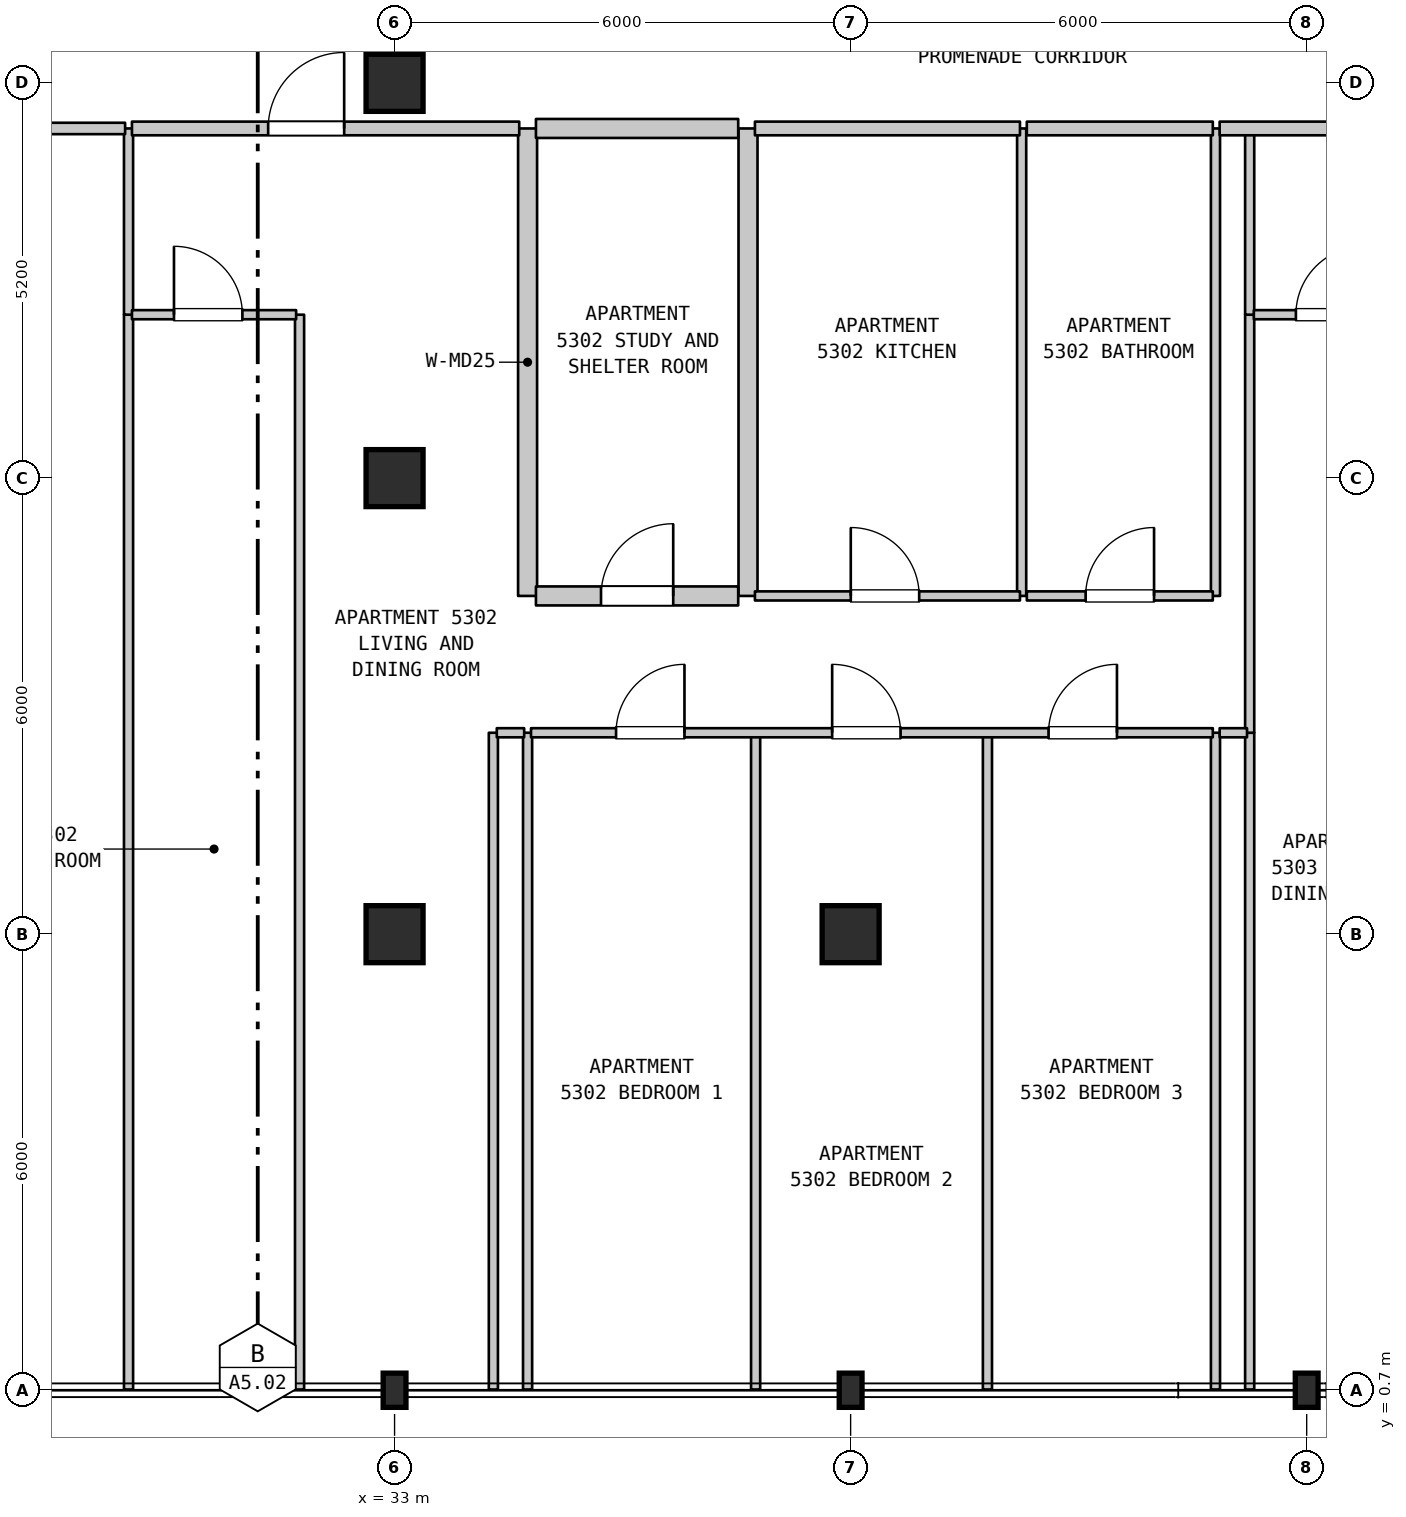
"""IFC4 building model, lengths in metres.
Left out: names, types, materials, properties, quantities, classifications, styles, units other than length and angle.
Written with IfcOpenShell. Run it as: python <this file> out.ifc"""

import sys

from ifc_helpers import new_model, si_unit, direction, frame, frame_2d, origin, origin_2d, place, context, subcontext, project, spatial, rectangle, i_section, extrude, element, fill, save


model = new_model("IFC4")
c1 = context("Model", 3, precision=1e-05, world=origin(), true_north=direction((0.0, 1.0)))
c2 = subcontext(c1, "Body", "Model", "MODEL_VIEW")
j1 = project(units=[si_unit("LENGTHUNIT", "METRE"), si_unit("PLANEANGLEUNIT", "RADIAN")], contexts=[c1])
p1 = place(None, origin())
s1 = spatial("IfcSite", under=j1, at=p1, CompositionType="ELEMENT")
p2 = place(p1, origin())
s2 = spatial("IfcBuilding", under=s1, at=p2, CompositionType="ELEMENT")
p3 = place(p2, frame((0.0, 0.0, 214.3)))
s3 = spatial("IfcBuildingStorey", under=s2, at=p3, CompositionType="ELEMENT", Elevation=214.3)
p4 = place(p3, frame((33.0, 0.7, 0.0), z_axis=(0.0, 0.0, 1.0), x_axis=(1.0, 0.0, 0.0)))
e1 = element("IfcColumn", 1, at=p4, inside=s3, PredefinedType="COLUMN", context=c2, shape_type="SweptSolid", body=[
    extrude(i_section(OverallWidth=0.3, OverallDepth=0.45, WebThickness=0.014, FlangeThickness=0.026, FilletRadius=0.027, at=origin_2d()), origin(), (0.0, 0.0, 1.0), 3.7),
])
for number, where, z_axis, x_axis in (
    (2, (33.0, 6.7, 0.0), (0.0, 0.0, 1.0), (1.0, 0.0, 0.0)),
    (3, (33.0, 12.7, 0.0), (0.0, 0.0, 1.0), (1.0, 0.0, 0.0)),
    (4, (33.0, 17.9, 0.0), (0.0, 0.0, 1.0), (1.0, 0.0, 0.0)),
):
    element("IfcColumn", number, at=place(p3, frame(where, z_axis=z_axis, x_axis=x_axis)), inside=s3, PredefinedType="COLUMN", context=c2, shape_type="SweptSolid", body=[
        extrude(rectangle(XDim=0.75, YDim=0.75, at=origin_2d()), origin(), (0.0, 0.0, 1.0), 3.7),
    ])
p5 = place(p3, frame((39.0, 0.7, 0.0), z_axis=(0.0, 0.0, 1.0), x_axis=(1.0, 0.0, 0.0)))
e5 = element("IfcColumn", 5, at=p5, inside=s3, PredefinedType="COLUMN", context=c2, shape_type="SweptSolid", body=[
    extrude(i_section(OverallWidth=0.3, OverallDepth=0.45, WebThickness=0.014, FlangeThickness=0.026, FilletRadius=0.027, at=origin_2d()), origin(), (0.0, 0.0, 1.0), 3.7),
])
p6 = place(p3, frame((39.0, 6.7, 0.0), z_axis=(0.0, 0.0, 1.0), x_axis=(1.0, 0.0, 0.0)))
e6 = element("IfcColumn", 6, at=p6, inside=s3, PredefinedType="COLUMN", context=c2, shape_type="SweptSolid", body=[
    extrude(rectangle(XDim=0.75, YDim=0.75, at=origin_2d()), origin(), (0.0, 0.0, 1.0), 3.7),
])
p7 = place(p3, frame((45.0, 0.7, 0.0), z_axis=(0.0, 0.0, 1.0), x_axis=(1.0, 0.0, 0.0)))
e7 = element("IfcColumn", 7, at=p7, inside=s3, PredefinedType="COLUMN", context=c2, shape_type="SweptSolid", body=[
    extrude(i_section(OverallWidth=0.3, OverallDepth=0.45, WebThickness=0.014, FlangeThickness=0.026, FilletRadius=0.027, at=origin_2d()), origin(), (0.0, 0.0, 1.0), 3.7),
])
p8 = place(p3, frame((29.5, 0.71, 0.0), z_axis=(0.0, 0.0, 1.0), x_axis=(0.0, 1.0, 0.0)))
e8 = element("IfcWall", 8, at=p8, inside=s3, PredefinedType="PARTITIONING", context=c2, shape_type="SweptSolid", body=[
    extrude(rectangle(XDim=14.14, YDim=0.12, at=frame_2d((7.07, 0.0))), origin(), (0.0, 0.0, 1.0), 3.38),
])
p9 = place(p3, frame((29.5, 14.85, 0.0), z_axis=(0.0, 0.0, 1.0), x_axis=(0.0, 1.0, 0.0)))
e9 = element("IfcWall", 9, at=p9, inside=s3, PredefinedType="PARTITIONING", context=c2, shape_type="SweptSolid", body=[
    extrude(rectangle(XDim=2.45, YDim=0.12, at=frame_2d((1.225, 0.0))), origin(), (0.0, 0.0, 1.0), 3.38),
])
p10 = place(p3, frame((31.75, 0.71, 0.0), z_axis=(0.0, 0.0, 1.0), x_axis=(0.0, 1.0, 0.0)))
e10 = element("IfcWall", 10, at=p10, inside=s3, PredefinedType="PARTITIONING", context=c2, shape_type="SweptSolid", body=[
    extrude(rectangle(XDim=14.14, YDim=0.12, at=frame_2d((7.07, 0.0))), origin(), (0.0, 0.0, 1.0), 3.38),
])
for number, where, z_axis, x_axis in (
    (11, (34.3, 0.71, 0.0), (0.0, 0.0, 1.0), (0.0, 1.0, 0.0)),
    (12, (34.75, 0.71, 0.0), (0.0, 0.0, 1.0), (0.0, 1.0, 0.0)),
):
    element("IfcWall", number, at=place(p3, frame(where, z_axis=z_axis, x_axis=x_axis)), inside=s3, PredefinedType="PARTITIONING", context=c2, shape_type="SweptSolid", body=[
        extrude(rectangle(XDim=8.64, YDim=0.12, at=frame_2d((4.32, 0.0))), origin(), (0.0, 0.0, 1.0), 3.38),
    ])
for number, where, z_axis, x_axis in (
    (13, (34.75, 11.15, 0.0), (0.0, 0.0, 1.0), (0.0, 1.0, 0.0)),
    (14, (37.65, 11.15, 0.0), (0.0, 0.0, 1.0), (0.0, 1.0, 0.0)),
):
    element("IfcWall", number, at=place(p3, frame(where, z_axis=z_axis, x_axis=x_axis)), inside=s3, PredefinedType="STANDARD", context=c2, shape_type="SweptSolid", body=[
        extrude(rectangle(XDim=6.15, YDim=0.25, at=frame_2d((3.075, 0.0))), origin(), (0.0, 0.0, 1.0), 3.38),
    ])
for number, where, z_axis, x_axis in (
    (15, (37.75, 0.71, 0.0), (0.0, 0.0, 1.0), (0.0, 1.0, 0.0)),
    (16, (40.8, 0.71, 0.0), (0.0, 0.0, 1.0), (0.0, 1.0, 0.0)),
):
    element("IfcWall", number, at=place(p3, frame(where, z_axis=z_axis, x_axis=x_axis)), inside=s3, PredefinedType="PARTITIONING", context=c2, shape_type="SweptSolid", body=[
        extrude(rectangle(XDim=8.64, YDim=0.12, at=frame_2d((4.32, 0.0))), origin(), (0.0, 0.0, 1.0), 3.38),
    ])
p11 = place(p3, frame((41.25, 11.15, 0.0), z_axis=(0.0, 0.0, 1.0), x_axis=(0.0, 1.0, 0.0)))
e17 = element("IfcWall", 17, at=p11, inside=s3, PredefinedType="PARTITIONING", context=c2, shape_type="SweptSolid", body=[
    extrude(rectangle(XDim=6.15, YDim=0.12, at=frame_2d((3.075, 0.0))), origin(), (0.0, 0.0, 1.0), 3.38),
])
p12 = place(p3, frame((43.8, 0.71, 0.0), z_axis=(0.0, 0.0, 1.0), x_axis=(0.0, 1.0, 0.0)))
e18 = element("IfcWall", 18, at=p12, inside=s3, PredefinedType="PARTITIONING", context=c2, shape_type="SweptSolid", body=[
    extrude(rectangle(XDim=8.64, YDim=0.12, at=frame_2d((4.32, 0.0))), origin(), (0.0, 0.0, 1.0), 3.38),
])
p13 = place(p3, frame((43.8, 11.15, 0.0), z_axis=(0.0, 0.0, 1.0), x_axis=(0.0, 1.0, 0.0)))
e19 = element("IfcWall", 19, at=p13, inside=s3, PredefinedType="PARTITIONING", context=c2, shape_type="SweptSolid", body=[
    extrude(rectangle(XDim=6.15, YDim=0.12, at=frame_2d((3.075, 0.0))), origin(), (0.0, 0.0, 1.0), 3.38),
])
p14 = place(p3, frame((44.25, 0.71, 0.0), z_axis=(0.0, 0.0, 1.0), x_axis=(0.0, 1.0, 0.0)))
e20 = element("IfcWall", 20, at=p14, inside=s3, PredefinedType="PARTITIONING", context=c2, shape_type="SweptSolid", body=[
    extrude(rectangle(XDim=8.64, YDim=0.12, at=frame_2d((4.32, 0.0))), origin(), (0.0, 0.0, 1.0), 3.38),
])
p15 = place(p3, frame((44.25, 9.35, 0.0), z_axis=(0.0, 0.0, 1.0), x_axis=(0.0, 1.0, 0.0)))
e21 = element("IfcWall", 21, at=p15, inside=s3, PredefinedType="PARTITIONING", context=c2, shape_type="SweptSolid", body=[
    extrude(rectangle(XDim=5.5, YDim=0.12, at=frame_2d((2.75, 0.0))), origin(), (0.0, 0.0, 1.0), 3.38),
])
p16 = place(p3, frame((44.25, 14.85, 0.0), z_axis=(0.0, 0.0, 1.0), x_axis=(0.0, 1.0, 0.0)))
e22 = element("IfcWall", 22, at=p16, inside=s3, PredefinedType="PARTITIONING", context=c2, shape_type="SweptSolid", body=[
    extrude(rectangle(XDim=2.45, YDim=0.12, at=frame_2d((1.225, 0.0))), origin(), (0.0, 0.0, 1.0), 3.38),
])
p17 = place(p3, frame((34.345, 9.35, 0.0), z_axis=(0.0, 0.0, 1.0), x_axis=(1.0, 0.0, 0.0)))
e23 = element("IfcWall", 23, at=p17, inside=s3, PredefinedType="PARTITIONING", context=c2, shape_type="SweptSolid", body=[
    extrude(rectangle(XDim=0.36, YDim=0.12, at=frame_2d((0.18, 0.0))), origin(), (0.0, 0.0, 1.0), 3.38),
])
p18 = place(p3, frame((34.795, 9.35, 0.0), z_axis=(0.0, 0.0, 1.0), x_axis=(1.0, 0.0, 0.0)))
e24 = element("IfcWall", 24, at=p18, inside=s3, PredefinedType="PARTITIONING", context=c2, shape_type="SweptSolid", body=[
    extrude(rectangle(XDim=8.97, YDim=0.12, at=frame_2d((4.485, 0.0))), origin(), (0.0, 0.0, 1.0), 3.38),
])
p19 = place(p18, frame((1.119, 0.0, 0.0)))
e25 = element("IfcOpeningElement", 25, at=p19, cuts=e24, PredefinedType="OPENING", context=c2, shape_type="SweptSolid", body=[
    extrude(rectangle(XDim=0.9, YDim=2.15, at=frame_2d((0.45, 1.075))), frame((0.0, 0.07, 0.0), z_axis=(0.0, -1.0, 0.0), x_axis=(1.0, 0.0, 0.0)), (0.0, 0.0, 1.0), 0.14),
])
p20 = place(p18, frame((3.962, 0.0, 0.0)))
e26 = element("IfcOpeningElement", 26, at=p20, cuts=e24, PredefinedType="OPENING", context=c2, shape_type="SweptSolid", body=[
    extrude(rectangle(XDim=0.9, YDim=2.15, at=frame_2d((0.45, 1.075))), frame((0.0, 0.07, 0.0), z_axis=(0.0, -1.0, 0.0), x_axis=(1.0, 0.0, 0.0)), (0.0, 0.0, 1.0), 0.14),
])
p21 = place(p18, frame((6.809, 0.0, 0.0)))
e27 = element("IfcOpeningElement", 27, at=p21, cuts=e24, PredefinedType="OPENING", context=c2, shape_type="SweptSolid", body=[
    extrude(rectangle(XDim=0.9, YDim=2.15, at=frame_2d((0.45, 1.075))), frame((0.0, 0.07, 0.0), z_axis=(0.0, -1.0, 0.0), x_axis=(1.0, 0.0, 0.0)), (0.0, 0.0, 1.0), 0.14),
])
p22 = place(p3, frame((43.855, 9.35, 0.0), z_axis=(0.0, 0.0, 1.0), x_axis=(1.0, 0.0, 0.0)))
e28 = element("IfcWall", 28, at=p22, inside=s3, PredefinedType="PARTITIONING", context=c2, shape_type="SweptSolid", body=[
    extrude(rectangle(XDim=0.36, YDim=0.12, at=frame_2d((0.18, 0.0))), origin(), (0.0, 0.0, 1.0), 3.38),
])
p23 = place(p3, frame((34.86, 11.15, 0.0), z_axis=(0.0, 0.0, 1.0), x_axis=(1.0, 0.0, 0.0)))
e29 = element("IfcWall", 29, at=p23, inside=s3, PredefinedType="STANDARD", context=c2, shape_type="SweptSolid", body=[
    extrude(rectangle(XDim=2.661, YDim=0.25, at=frame_2d((1.331, 0.0))), origin(), (0.0, 0.0, 1.0), 3.38),
])
p24 = place(p23, frame((0.856, 0.0, 0.0)))
e30 = element("IfcOpeningElement", 30, at=p24, cuts=e29, PredefinedType="OPENING", context=c2, shape_type="SweptSolid", body=[
    extrude(rectangle(XDim=0.95, YDim=2.15, at=frame_2d((0.475, 1.075))), frame((0.0, 0.135, 0.0), z_axis=(0.0, -1.0, 0.0), x_axis=(1.0, 0.0, 0.0)), (0.0, 0.0, 1.0), 0.27),
])
p25 = place(p3, frame((37.741, 11.15, 0.0), z_axis=(0.0, 0.0, 1.0), x_axis=(1.0, 0.0, 0.0)))
e31 = element("IfcWall", 31, at=p25, inside=s3, PredefinedType="PARTITIONING", context=c2, shape_type="SweptSolid", body=[
    extrude(rectangle(XDim=3.487, YDim=0.12, at=frame_2d((1.744, 0.0))), origin(), (0.0, 0.0, 1.0), 3.38),
])
p26 = place(p25, frame((1.261, 0.0, 0.0)))
e32 = element("IfcOpeningElement", 32, at=p26, cuts=e31, PredefinedType="OPENING", context=c2, shape_type="SweptSolid", body=[
    extrude(rectangle(XDim=0.9, YDim=2.15, at=frame_2d((0.45, 1.075))), frame((0.0, 0.07, 0.0), z_axis=(0.0, -1.0, 0.0), x_axis=(1.0, 0.0, 0.0)), (0.0, 0.0, 1.0), 0.14),
])
p27 = place(p3, frame((41.318, 11.15, 0.0), z_axis=(0.0, 0.0, 1.0), x_axis=(1.0, 0.0, 0.0)))
e33 = element("IfcWall", 33, at=p27, inside=s3, PredefinedType="PARTITIONING", context=c2, shape_type="SweptSolid", body=[
    extrude(rectangle(XDim=2.447, YDim=0.12, at=frame_2d((1.223, 0.0))), origin(), (0.0, 0.0, 1.0), 3.38),
])
p28 = place(p27, frame((0.774, 0.0, 0.0)))
e34 = element("IfcOpeningElement", 34, at=p28, cuts=e33, PredefinedType="OPENING", context=c2, shape_type="SweptSolid", body=[
    extrude(rectangle(XDim=0.9, YDim=2.1, at=frame_2d((0.45, 1.05))), frame((0.0, 0.07, 0.0), z_axis=(0.0, -1.0, 0.0), x_axis=(1.0, 0.0, 0.0)), (0.0, 0.0, 1.0), 0.14),
])
p29 = place(p3, frame((29.545, 14.85, 0.0), z_axis=(0.0, 0.0, 1.0), x_axis=(1.0, 0.0, 0.0)))
e35 = element("IfcWall", 35, at=p29, inside=s3, PredefinedType="PARTITIONING", context=c2, shape_type="SweptSolid", body=[
    extrude(rectangle(XDim=2.16, YDim=0.12, at=frame_2d((1.08, 0.0))), origin(), (0.0, 0.0, 1.0), 3.38),
])
p30 = place(p29, frame((0.553, 0.0, 0.0)))
e36 = element("IfcOpeningElement", 36, at=p30, cuts=e35, PredefinedType="OPENING", context=c2, shape_type="SweptSolid", body=[
    extrude(rectangle(XDim=0.9, YDim=2.15, at=frame_2d((0.45, 1.075))), frame((0.0, 0.07, 0.0), z_axis=(0.0, -1.0, 0.0), x_axis=(1.0, 0.0, 0.0)), (0.0, 0.0, 1.0), 0.14),
])
p31 = place(p3, frame((44.305, 14.85, 0.0), z_axis=(0.0, 0.0, 1.0), x_axis=(1.0, 0.0, 0.0)))
e37 = element("IfcWall", 37, at=p31, inside=s3, PredefinedType="PARTITIONING", context=c2, shape_type="SweptSolid", body=[
    extrude(rectangle(XDim=2.16, YDim=0.12, at=frame_2d((1.08, 0.0))), origin(), (0.0, 0.0, 1.0), 3.38),
])
p32 = place(p31, frame((0.553, 0.0, 0.0)))
e38 = element("IfcOpeningElement", 38, at=p32, cuts=e37, PredefinedType="OPENING", context=c2, shape_type="SweptSolid", body=[
    extrude(rectangle(XDim=0.9, YDim=2.15, at=frame_2d((0.45, 1.075))), frame((0.0, 0.07, 0.0), z_axis=(0.0, -1.0, 0.0), x_axis=(1.0, 0.0, 0.0)), (0.0, 0.0, 1.0), 0.14),
])
p33 = place(p3, frame((24.845, 17.3, 0.0), z_axis=(0.0, 0.0, 1.0), x_axis=(1.0, 0.0, 0.0)))
e39 = element("IfcWall", 39, at=p33, inside=s3, PredefinedType="STANDARD", context=c2, shape_type="SweptSolid", body=[
    extrude(rectangle(XDim=4.61, YDim=0.15, at=frame_2d((2.305, 0.0))), origin(), (0.0, 0.0, 1.0), 3.38),
])
p34 = place(p33, frame((1.734, 0.0, 0.0)))
e40 = element("IfcOpeningElement", 40, at=p34, cuts=e39, PredefinedType="OPENING", context=c2, shape_type="SweptSolid", body=[
    extrude(rectangle(XDim=1.0, YDim=2.15, at=frame_2d((0.5, 1.075))), frame((0.0, 0.085, 0.0), z_axis=(0.0, -1.0, 0.0), x_axis=(1.0, 0.0, 0.0)), (0.0, 0.0, 1.0), 0.17),
])
p35 = place(p3, frame((29.545, 17.3, 0.0), z_axis=(0.0, 0.0, 1.0), x_axis=(1.0, 0.0, 0.0)))
e41 = element("IfcWall", 41, at=p35, inside=s3, PredefinedType="STANDARD", context=c2, shape_type="SweptSolid", body=[
    extrude(rectangle(XDim=5.095, YDim=0.18, at=frame_2d((2.547, 0.0))), origin(), (0.0, 0.0, 1.0), 3.38),
])
p36 = place(p35, frame((1.792, 0.0, 0.0)))
e42 = element("IfcOpeningElement", 42, at=p36, cuts=e41, PredefinedType="OPENING", context=c2, shape_type="SweptSolid", body=[
    extrude(rectangle(XDim=1.0, YDim=2.15, at=frame_2d((0.5, 1.075))), frame((0.0, 0.1, 0.0), z_axis=(0.0, -1.0, 0.0), x_axis=(1.0, 0.0, 0.0)), (0.0, 0.0, 1.0), 0.2),
])
p37 = place(p3, frame((34.86, 17.3, 0.0), z_axis=(0.0, 0.0, 1.0), x_axis=(1.0, 0.0, 0.0)))
e43 = element("IfcWall", 43, at=p37, inside=s3, PredefinedType="STANDARD", context=c2, shape_type="SweptSolid", body=[
    extrude(rectangle(XDim=2.661, YDim=0.25, at=frame_2d((1.331, 0.0))), origin(), (0.0, 0.0, 1.0), 3.38),
])
p38 = place(p3, frame((37.741, 17.3, 0.0), z_axis=(0.0, 0.0, 1.0), x_axis=(1.0, 0.0, 0.0)))
e44 = element("IfcWall", 44, at=p38, inside=s3, PredefinedType="STANDARD", context=c2, shape_type="SweptSolid", body=[
    extrude(rectangle(XDim=3.487, YDim=0.18, at=frame_2d((1.744, 0.0))), origin(), (0.0, 0.0, 1.0), 3.38),
])
p39 = place(p3, frame((41.318, 17.3, 0.0), z_axis=(0.0, 0.0, 1.0), x_axis=(1.0, 0.0, 0.0)))
e45 = element("IfcWall", 45, at=p39, inside=s3, PredefinedType="STANDARD", context=c2, shape_type="SweptSolid", body=[
    extrude(rectangle(XDim=2.447, YDim=0.18, at=frame_2d((1.223, 0.0))), origin(), (0.0, 0.0, 1.0), 3.38),
])
p40 = place(p3, frame((43.855, 17.3, 0.0), z_axis=(0.0, 0.0, 1.0), x_axis=(1.0, 0.0, 0.0)))
e46 = element("IfcWall", 46, at=p40, inside=s3, PredefinedType="STANDARD", context=c2, shape_type="SweptSolid", body=[
    extrude(rectangle(XDim=5.21, YDim=0.18, at=frame_2d((2.605, 0.0))), origin(), (0.0, 0.0, 1.0), 3.38),
])
p41 = place(p40, frame((2.305, 0.0, 0.0)))
e47 = element("IfcOpeningElement", 47, at=p41, cuts=e46, PredefinedType="OPENING", context=c2, shape_type="SweptSolid", body=[
    extrude(rectangle(XDim=1.0, YDim=2.15, at=frame_2d((0.5, 1.075))), frame((0.0, 0.1, 0.0), z_axis=(0.0, -1.0, 0.0), x_axis=(1.0, 0.0, 0.0)), (0.0, 0.0, 1.0), 0.2),
])
p42 = place(p19, origin())
e48 = element("IfcDoor", 48, at=p42, inside=s3, OperationType="SINGLE_SWING_RIGHT", PredefinedType="DOOR", context=c2, shape_type="SweptSolid", body=[
    extrude(rectangle(XDim=0.9, YDim=2.15, at=frame_2d((0.45, 1.075))), frame((0.0, 0.025, 0.0), z_axis=(0.0, -1.0, 0.0), x_axis=(1.0, 0.0, 0.0)), (0.0, 0.0, 1.0), 0.05),
])
fill(e25, e48)
p43 = place(p20, origin())
e49 = element("IfcDoor", 49, at=p43, inside=s3, OperationType="SINGLE_SWING_LEFT", PredefinedType="DOOR", context=c2, shape_type="SweptSolid", body=[
    extrude(rectangle(XDim=0.9, YDim=2.15, at=frame_2d((0.45, 1.075))), frame((0.0, 0.025, 0.0), z_axis=(0.0, -1.0, 0.0), x_axis=(1.0, 0.0, 0.0)), (0.0, 0.0, 1.0), 0.05),
])
fill(e26, e49)
p44 = place(p21, origin())
e50 = element("IfcDoor", 50, at=p44, inside=s3, OperationType="SINGLE_SWING_RIGHT", PredefinedType="DOOR", context=c2, shape_type="SweptSolid", body=[
    extrude(rectangle(XDim=0.9, YDim=2.15, at=frame_2d((0.45, 1.075))), frame((0.0, 0.025, 0.0), z_axis=(0.0, -1.0, 0.0), x_axis=(1.0, 0.0, 0.0)), (0.0, 0.0, 1.0), 0.05),
])
fill(e27, e50)
p45 = place(p24, origin())
e51 = element("IfcDoor", 51, at=p45, inside=s3, OperationType="SINGLE_SWING_RIGHT", PredefinedType="DOOR", context=c2, shape_type="SweptSolid", body=[
    extrude(rectangle(XDim=0.95, YDim=2.15, at=frame_2d((0.475, 1.075))), frame((0.0, 0.025, 0.0), z_axis=(0.0, -1.0, 0.0), x_axis=(1.0, 0.0, 0.0)), (0.0, 0.0, 1.0), 0.05),
])
fill(e30, e51)
p46 = place(p26, origin())
e52 = element("IfcDoor", 52, at=p46, inside=s3, OperationType="SINGLE_SWING_LEFT", PredefinedType="DOOR", context=c2, shape_type="SweptSolid", body=[
    extrude(rectangle(XDim=0.9, YDim=2.15, at=frame_2d((0.45, 1.075))), frame((0.0, 0.025, 0.0), z_axis=(0.0, -1.0, 0.0), x_axis=(1.0, 0.0, 0.0)), (0.0, 0.0, 1.0), 0.05),
])
fill(e32, e52)
p47 = place(p28, origin())
e53 = element("IfcDoor", 53, at=p47, inside=s3, OperationType="SINGLE_SWING_RIGHT", PredefinedType="DOOR", context=c2, shape_type="SweptSolid", body=[
    extrude(rectangle(XDim=0.9, YDim=2.1, at=frame_2d((0.45, 1.05))), frame((0.0, 0.025, 0.0), z_axis=(0.0, -1.0, 0.0), x_axis=(1.0, 0.0, 0.0)), (0.0, 0.0, 1.0), 0.05),
])
fill(e34, e53)
p48 = place(p30, origin())
e54 = element("IfcDoor", 54, at=p48, inside=s3, OperationType="SINGLE_SWING_LEFT", PredefinedType="DOOR", context=c2, shape_type="SweptSolid", body=[
    extrude(rectangle(XDim=0.9, YDim=2.15, at=frame_2d((0.45, 1.075))), frame((0.0, 0.025, 0.0), z_axis=(0.0, -1.0, 0.0), x_axis=(1.0, 0.0, 0.0)), (0.0, 0.0, 1.0), 0.05),
])
fill(e36, e54)
p49 = place(p32, origin())
e55 = element("IfcDoor", 55, at=p49, inside=s3, OperationType="SINGLE_SWING_RIGHT", PredefinedType="DOOR", context=c2, shape_type="SweptSolid", body=[
    extrude(rectangle(XDim=0.9, YDim=2.15, at=frame_2d((0.45, 1.075))), frame((0.0, 0.025, 0.0), z_axis=(0.0, -1.0, 0.0), x_axis=(1.0, 0.0, 0.0)), (0.0, 0.0, 1.0), 0.05),
])
fill(e38, e55)
p50 = place(p36, origin())
e56 = element("IfcDoor", 56, at=p50, inside=s3, OperationType="SINGLE_SWING_RIGHT", PredefinedType="DOOR", context=c2, shape_type="SweptSolid", body=[
    extrude(rectangle(XDim=1.0, YDim=2.15, at=frame_2d((0.5, 1.075))), frame((0.0, 0.025, 0.0), z_axis=(0.0, -1.0, 0.0), x_axis=(1.0, 0.0, 0.0)), (0.0, 0.0, 1.0), 0.05),
])
fill(e42, e56)
save(model, sys.argv[1])
